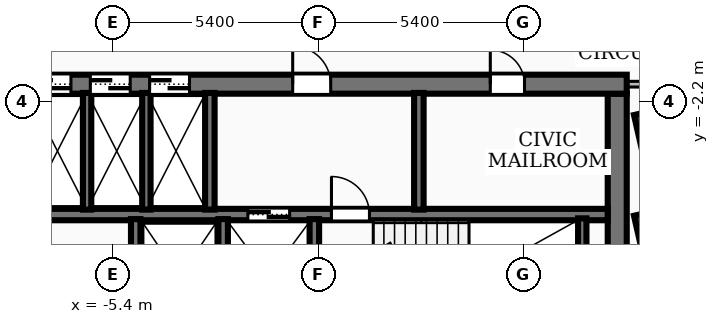
"""IFC4 building model, lengths in metres.
Left out: names, types, materials, properties, quantities, classifications, styles, units other than length and angle.
Written with IfcOpenShell. Run it as: python <this file> out.ifc"""

import sys

from ifc_helpers import new_model, si_unit, direction, frame, frame_2d, origin, origin_2d, place, context, subcontext, project, spatial, rectangle, extrude, element, fill, save


model = new_model("IFC4")
c1 = context("Model", 3, precision=1e-05, world=origin(), true_north=direction((0.0, 1.0)))
c2 = subcontext(c1, "Body", "Model", "MODEL_VIEW")
j1 = project(units=[si_unit("LENGTHUNIT", "METRE"), si_unit("PLANEANGLEUNIT", "RADIAN")], contexts=[c1])
p1 = place(None, origin())
s1 = spatial("IfcSite", under=j1, at=p1, CompositionType="ELEMENT")
p2 = place(p1, origin())
s2 = spatial("IfcBuilding", under=s1, at=p2, CompositionType="ELEMENT")
p3 = place(p2, frame((0.0, 0.0, 119.88)))
s3 = spatial("IfcBuildingStorey", under=s2, at=p3, CompositionType="ELEMENT", Elevation=119.88)
p4 = place(p3, frame((-8.12, -1.75, 0.0), z_axis=(0.0, 0.0, 1.0), x_axis=(1.0, 0.0, 0.0)))
e1 = element("IfcWall", 1, at=p4, inside=s3, PredefinedType="SHEAR", context=c2, shape_type="SweptSolid", body=[
    extrude(rectangle(XDim=16.24, YDim=0.5, at=frame_2d((8.12, 0.0))), origin(), (0.0, 0.0, 1.0), 3.34),
])
p5 = place(p4, frame((7.45, 0.0, 0.0)))
e2 = element("IfcOpeningElement", 2, at=p5, cuts=e1, PredefinedType="OPENING", context=c2, shape_type="SweptSolid", body=[
    extrude(rectangle(XDim=1.0, YDim=2.1, at=frame_2d((0.5, 1.05))), frame((0.0, 0.26, 0.0), z_axis=(0.0, -1.0, 0.0), x_axis=(1.0, 0.0, 0.0)), (0.0, 0.0, 1.0), 0.52),
])
p6 = place(p4, frame((12.65, 0.0, 0.0)))
e3 = element("IfcOpeningElement", 3, at=p6, cuts=e1, PredefinedType="OPENING", context=c2, shape_type="SweptSolid", body=[
    extrude(rectangle(XDim=0.9, YDim=2.06, at=frame_2d((0.45, 1.03))), frame((0.0, 0.26, 0.0), z_axis=(0.0, -1.0, 0.0), x_axis=(1.0, 0.0, 0.0)), (0.0, 0.0, 1.0), 0.52),
])
p7 = place(p4, frame((0.565, 0.0, 0.0)))
e4 = element("IfcOpeningElement", 4, at=p7, cuts=e1, PredefinedType="OPENING", context=c2, shape_type="SweptSolid", body=[
    extrude(rectangle(XDim=1.05, YDim=2.15, at=frame_2d((0.525, 1.075))), frame((0.0, 0.26, 0.0), z_axis=(0.0, -1.0, 0.0), x_axis=(1.0, 0.0, 0.0)), (0.0, 0.0, 1.0), 0.52),
])
p8 = place(p4, frame((2.125, 0.0, 0.0)))
e5 = element("IfcOpeningElement", 5, at=p8, cuts=e1, PredefinedType="OPENING", context=c2, shape_type="SweptSolid", body=[
    extrude(rectangle(XDim=1.05, YDim=2.15, at=frame_2d((0.525, 1.075))), frame((0.0, 0.26, 0.0), z_axis=(0.0, -1.0, 0.0), x_axis=(1.0, 0.0, 0.0)), (0.0, 0.0, 1.0), 0.52),
])
p9 = place(p4, frame((3.685, 0.0, 0.0)))
e6 = element("IfcOpeningElement", 6, at=p9, cuts=e1, PredefinedType="OPENING", context=c2, shape_type="SweptSolid", body=[
    extrude(rectangle(XDim=1.05, YDim=2.15, at=frame_2d((0.525, 1.075))), frame((0.0, 0.26, 0.0), z_axis=(0.0, -1.0, 0.0), x_axis=(1.0, 0.0, 0.0)), (0.0, 0.0, 1.0), 0.52),
])
p10 = place(p3, frame((7.87, -2.0, 0.0), z_axis=(0.0, 0.0, 1.0), x_axis=(0.0, -1.0, 0.0)))
e7 = element("IfcWall", 7, at=p10, inside=s3, PredefinedType="SHEAR", context=c2, shape_type="SweptSolid", body=[
    extrude(rectangle(XDim=6.31, YDim=0.5, at=frame_2d((3.155, 0.0))), origin(), (0.0, 0.0, 1.0), 3.34),
])
p11 = place(p3, frame((-7.62, -5.18, 0.0), z_axis=(0.0, 0.0, 1.0), x_axis=(1.0, 0.0, 0.0)))
e8 = element("IfcWall", 8, at=p11, inside=s3, PredefinedType="SOLIDWALL", context=c2, shape_type="SweptSolid", body=[
    extrude(rectangle(XDim=15.24, YDim=0.3, at=frame_2d((7.62, 0.0))), origin(), (0.0, 0.0, 1.0), 3.34),
])
p12 = place(p11, frame((5.77, 0.0, 0.0)))
e9 = element("IfcOpeningElement", 9, at=p12, cuts=e8, PredefinedType="OPENING", context=c2, shape_type="SweptSolid", body=[
    extrude(rectangle(XDim=1.1, YDim=2.15, at=frame_2d((0.55, 1.075))), frame((0.0, 0.16, 0.0), z_axis=(0.0, -1.0, 0.0), x_axis=(1.0, 0.0, 0.0)), (0.0, 0.0, 1.0), 0.32),
])
p13 = place(p11, frame((7.97, 0.0, 0.0)))
e10 = element("IfcOpeningElement", 10, at=p13, cuts=e8, PredefinedType="OPENING", context=c2, shape_type="SweptSolid", body=[
    extrude(rectangle(XDim=1.0, YDim=2.1, at=frame_2d((0.5, 1.05))), frame((0.0, 0.16, 0.0), z_axis=(0.0, -1.0, 0.0), x_axis=(1.0, 0.0, 0.0)), (0.0, 0.0, 1.0), 0.32),
])
p14 = place(p3, frame((6.95, -8.34, 0.0), z_axis=(0.0, 0.0, 1.0), x_axis=(0.0, 1.0, 0.0)))
e11 = element("IfcWall", 11, at=p14, inside=s3, PredefinedType="SOLIDWALL", context=c2, shape_type="SweptSolid", body=[
    extrude(rectangle(XDim=3.06, YDim=0.22, at=frame_2d((1.53, 0.0))), origin(), (0.0, 0.0, 1.0), 3.34),
])
for number, where, z_axis, x_axis in (
    (12, (-0.1, -8.34, 0.0), (0.0, 0.0, 1.0), (0.0, 1.0, 0.0)),
    (13, (-2.5, -8.34, 0.0), (0.0, 0.0, 1.0), (0.0, 1.0, 0.0)),
    (14, (-4.8, -8.34, 0.0), (0.0, 0.0, 1.0), (0.0, 1.0, 0.0)),
):
    element("IfcWall", number, at=place(p3, frame(where, z_axis=z_axis, x_axis=x_axis)), inside=s3, PredefinedType="SOLIDWALL", context=c2, shape_type="SweptSolid", body=[
        extrude(rectangle(XDim=3.04, YDim=0.25, at=frame_2d((1.52, 0.0))), origin(), (0.0, 0.0, 1.0), 3.34),
    ])
for number, where, z_axis, x_axis in (
    (15, (-2.85, -5.05, 0.0), (0.0, 0.0, 1.0), (0.0, 1.0, 0.0)),
    (16, (2.65, -5.05, 0.0), (0.0, 0.0, 1.0), (0.0, 1.0, 0.0)),
):
    element("IfcWall", number, at=place(p3, frame(where, z_axis=z_axis, x_axis=x_axis)), inside=s3, PredefinedType="SOLIDWALL", context=c2, shape_type="SweptSolid", body=[
        extrude(rectangle(XDim=3.07, YDim=0.25, at=frame_2d((1.535, 0.0))), origin(), (0.0, 0.0, 1.0), 3.34),
    ])
for number, where, z_axis, x_axis in (
    (17, (-6.08, -5.05, 0.0), (0.0, 0.0, 1.0), (0.0, 1.0, 0.0)),
    (18, (-4.52, -5.05, 0.0), (0.0, 0.0, 1.0), (0.0, 1.0, 0.0)),
):
    element("IfcWall", number, at=place(p3, frame(where, z_axis=z_axis, x_axis=x_axis)), inside=s3, PredefinedType="SOLIDWALL", context=c2, shape_type="SweptSolid", body=[
        extrude(rectangle(XDim=3.07, YDim=0.22, at=frame_2d((1.535, 0.0))), origin(), (0.0, 0.0, 1.0), 3.34),
    ])
for number, where, z_axis, x_axis in (
    (19, (8.85, -5.55, 0.0), (0.0, 0.0, 1.0), (0.975, 0.223, 0.0)),
    (20, (8.85, -2.9, 0.0), (0.0, 0.0, 1.0), (0.975, 0.223, 0.0)),
):
    element("IfcColumn", number, at=place(p3, frame(where, z_axis=z_axis, x_axis=x_axis)), inside=s3, PredefinedType="COLUMN", context=c2, shape_type="SweptSolid", body=[
        extrude(rectangle(XDim=0.9, YDim=0.9, at=origin_2d()), origin(), (0.0, 0.0, 1.0), 3.6),
    ])
p15 = place(p3, frame((7.85, -1.75, 0.0), z_axis=(0.0, 0.0, 1.0), x_axis=(1.0, 0.0, 0.0)))
e21 = element("IfcWall", 21, at=p15, inside=s3, PredefinedType="PARTITIONING", context=c2, shape_type="SweptSolid", body=[
    extrude(rectangle(XDim=1.67, YDim=0.15, at=frame_2d((0.835, 0.0))), origin(), (0.0, 0.0, 1.0), 2.57),
])
p16 = place(p5, origin())
e22 = element("IfcDoor", 22, at=p16, inside=s3, OperationType="SINGLE_SWING_LEFT", PredefinedType="DOOR", context=c2, shape_type="SweptSolid", body=[
    extrude(rectangle(XDim=1.0, YDim=2.1, at=frame_2d((0.5, 1.05))), frame((0.0, 0.025, 0.0), z_axis=(0.0, -1.0, 0.0), x_axis=(1.0, 0.0, 0.0)), (0.0, 0.0, 1.0), 0.05),
])
fill(e2, e22)
p17 = place(p12, origin())
e23 = element("IfcDoor", 23, at=p17, inside=s3, OperationType="DOUBLE_DOOR_SLIDING", PredefinedType="DOOR", context=c2, shape_type="SweptSolid", body=[
    extrude(rectangle(XDim=1.1, YDim=2.15, at=frame_2d((0.55, 1.075))), frame((0.0, 0.025, 0.0), z_axis=(0.0, -1.0, 0.0), x_axis=(1.0, 0.0, 0.0)), (0.0, 0.0, 1.0), 0.05),
])
fill(e9, e23)
p18 = place(p13, origin())
e24 = element("IfcDoor", 24, at=p18, inside=s3, OperationType="SINGLE_SWING_LEFT", PredefinedType="DOOR", context=c2, shape_type="SweptSolid", body=[
    extrude(rectangle(XDim=1.0, YDim=2.1, at=frame_2d((0.5, 1.05))), frame((0.0, 0.025, 0.0), z_axis=(0.0, -1.0, 0.0), x_axis=(1.0, 0.0, 0.0)), (0.0, 0.0, 1.0), 0.05),
])
fill(e10, e24)
p19 = place(p6, origin())
e25 = element("IfcDoor", 25, at=p19, inside=s3, OperationType="SINGLE_SWING_LEFT", PredefinedType="DOOR", context=c2, shape_type="SweptSolid", body=[
    extrude(rectangle(XDim=0.9, YDim=2.06, at=frame_2d((0.45, 1.03))), frame((0.0, 0.025, 0.0), z_axis=(0.0, -1.0, 0.0), x_axis=(1.0, 0.0, 0.0)), (0.0, 0.0, 1.0), 0.05),
])
fill(e3, e25)
p20 = place(p7, origin())
e26 = element("IfcDoor", 26, at=p20, inside=s3, OperationType="DOUBLE_DOOR_SLIDING", PredefinedType="DOOR", context=c2, shape_type="SweptSolid", body=[
    extrude(rectangle(XDim=1.05, YDim=2.15, at=frame_2d((0.525, 1.075))), frame((0.0, 0.025, 0.0), z_axis=(0.0, -1.0, 0.0), x_axis=(1.0, 0.0, 0.0)), (0.0, 0.0, 1.0), 0.05),
])
fill(e4, e26)
p21 = place(p8, origin())
e27 = element("IfcDoor", 27, at=p21, inside=s3, OperationType="DOUBLE_DOOR_SLIDING", PredefinedType="DOOR", context=c2, shape_type="SweptSolid", body=[
    extrude(rectangle(XDim=1.05, YDim=2.15, at=frame_2d((0.525, 1.075))), frame((0.0, 0.025, 0.0), z_axis=(0.0, -1.0, 0.0), x_axis=(1.0, 0.0, 0.0)), (0.0, 0.0, 1.0), 0.05),
])
fill(e5, e27)
p22 = place(p9, origin())
e28 = element("IfcDoor", 28, at=p22, inside=s3, OperationType="DOUBLE_DOOR_SLIDING", PredefinedType="DOOR", context=c2, shape_type="SweptSolid", body=[
    extrude(rectangle(XDim=1.05, YDim=2.15, at=frame_2d((0.525, 1.075))), frame((0.0, 0.025, 0.0), z_axis=(0.0, -1.0, 0.0), x_axis=(1.0, 0.0, 0.0)), (0.0, 0.0, 1.0), 0.05),
])
fill(e6, e28)
save(model, sys.argv[1])
